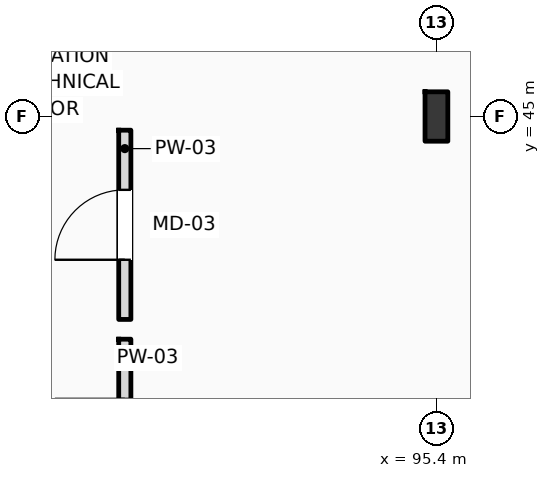
"""IFC4 building model, lengths in metres.
Left out: names, types, materials, properties, quantities, classifications, styles, units other than length and angle.
Written with IfcOpenShell. Run it as: python <this file> out.ifc"""

import sys

from ifc_helpers import new_model, si_unit, direction, frame, frame_2d, origin, origin_2d, place, context, subcontext, project, spatial, rectangle, i_section, extrude, element, fill, save


model = new_model("IFC4")
c1 = context("Model", 3, precision=1e-05, world=origin(), true_north=direction((0.0, 1.0)))
c2 = subcontext(c1, "Body", "Model", "MODEL_VIEW")
j1 = project(units=[si_unit("LENGTHUNIT", "METRE"), si_unit("PLANEANGLEUNIT", "RADIAN")], contexts=[c1])
p1 = place(None, origin())
s1 = spatial("IfcSite", under=j1, at=p1, CompositionType="ELEMENT")
p2 = place(p1, origin())
s2 = spatial("IfcBuilding", under=s1, at=p2, CompositionType="ELEMENT")
p3 = place(p2, frame((0.0, 0.0, 6.0)))
s3 = spatial("IfcBuildingStorey", under=s2, at=p3, CompositionType="ELEMENT", Elevation=6.0)
p4 = place(p3, frame((95.4, 45.0, 0.0), z_axis=(0.0, 0.0, 1.0), x_axis=(1.0, 0.0, 0.0)))
e1 = element("IfcColumn", 1, at=p4, inside=s3, PredefinedType="COLUMN", context=c2, shape_type="SweptSolid", body=[
    extrude(i_section(OverallWidth=0.3, OverallDepth=0.65, WebThickness=0.016, FlangeThickness=0.031, FilletRadius=0.027, at=origin_2d()), origin(), (0.0, 0.0, 1.0), 5.4),
])
p5 = place(p3, frame((91.3, 39.58, 0.0), z_axis=(0.0, 0.0, 1.0), x_axis=(0.0, 1.0, 0.0)))
e2 = element("IfcWall", 2, at=p5, inside=s3, PredefinedType="PARTITIONING", context=c2, shape_type="SweptSolid", body=[
    extrude(rectangle(XDim=2.49, YDim=0.16, at=frame_2d((1.245, 0.0))), origin(), (0.0, 0.0, 1.0), 5.05),
])
p6 = place(p5, frame((0.785, 0.0, 0.0)))
e3 = element("IfcOpeningElement", 3, at=p6, cuts=e2, PredefinedType="OPENING", context=c2, shape_type="SweptSolid", body=[
    extrude(rectangle(XDim=0.92, YDim=2.12, at=frame_2d((0.46, 1.06))), frame((0.0, 0.09, 0.0), z_axis=(0.0, -1.0, 0.0), x_axis=(1.0, 0.0, 0.0)), (0.0, 0.0, 1.0), 0.18),
])
p7 = place(p3, frame((91.3, 42.33, 0.0), z_axis=(0.0, 0.0, 1.0), x_axis=(0.0, 1.0, 0.0)))
e4 = element("IfcWall", 4, at=p7, inside=s3, PredefinedType="PARTITIONING", context=c2, shape_type="SweptSolid", body=[
    extrude(rectangle(XDim=2.49, YDim=0.16, at=frame_2d((1.245, 0.0))), origin(), (0.0, 0.0, 1.0), 5.05),
])
p8 = place(p7, frame((0.785, 0.0, 0.0)))
e5 = element("IfcOpeningElement", 5, at=p8, cuts=e4, PredefinedType="OPENING", context=c2, shape_type="SweptSolid", body=[
    extrude(rectangle(XDim=0.92, YDim=2.12, at=frame_2d((0.46, 1.06))), frame((0.0, 0.09, 0.0), z_axis=(0.0, -1.0, 0.0), x_axis=(1.0, 0.0, 0.0)), (0.0, 0.0, 1.0), 0.18),
])
p9 = place(p8, origin())
e6 = element("IfcDoor", 6, at=p9, inside=s3, OperationType="SINGLE_SWING_LEFT", PredefinedType="DOOR", context=c2, shape_type="SweptSolid", body=[
    extrude(rectangle(XDim=0.92, YDim=2.12, at=frame_2d((0.46, 1.06))), frame((0.0, 0.025, 0.0), z_axis=(0.0, -1.0, 0.0), x_axis=(1.0, 0.0, 0.0)), (0.0, 0.0, 1.0), 0.05),
])
fill(e5, e6)
save(model, sys.argv[1])
